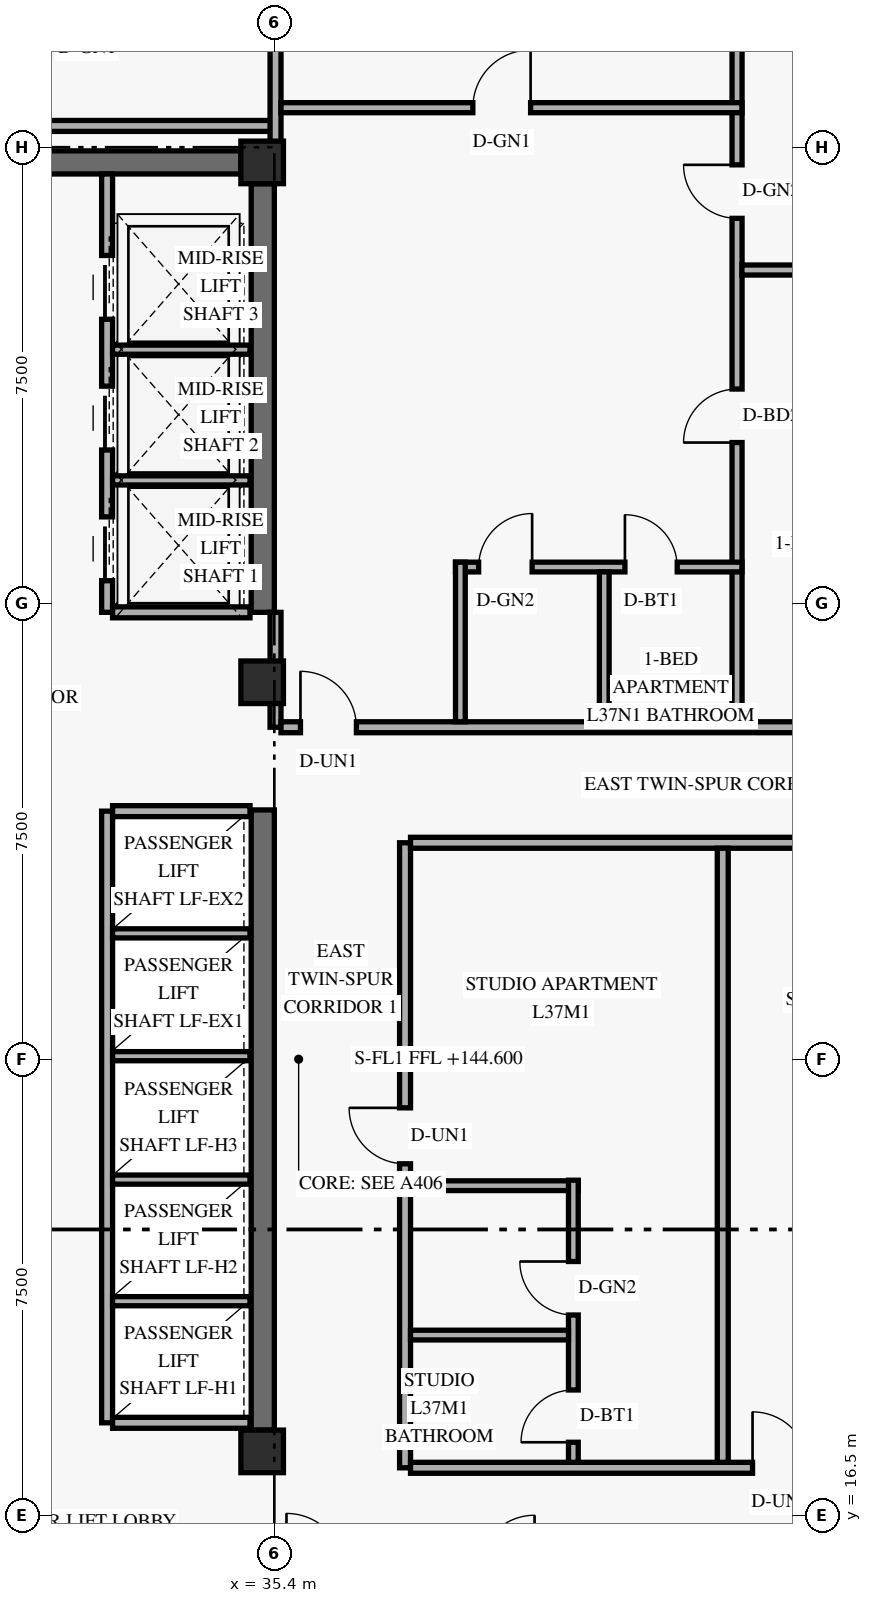
"""IFC4 building model, lengths in metres.
Left out: names, types, materials, properties, quantities, classifications, styles, units other than length and angle.
Written with IfcOpenShell. Run it as: python <this file> out.ifc"""

import sys

from ifc_helpers import new_model, si_unit, direction, frame, frame_2d, origin, origin_2d, place, context, subcontext, project, spatial, rectangle, extrude, element, fill, save


model = new_model("IFC4")
c1 = context("Model", 3, precision=1e-05, world=origin(), true_north=direction((0.0, 1.0)))
c2 = subcontext(c1, "Body", "Model", "MODEL_VIEW")
j1 = project(units=[si_unit("LENGTHUNIT", "METRE"), si_unit("PLANEANGLEUNIT", "RADIAN")], contexts=[c1])
p1 = place(None, origin())
s1 = spatial("IfcSite", under=j1, at=p1, CompositionType="ELEMENT")
p2 = place(p1, origin())
s2 = spatial("IfcBuilding", under=s1, at=p2, CompositionType="ELEMENT")
p3 = place(p2, frame((0.0, 0.0, 144.6)))
s3 = spatial("IfcBuildingStorey", under=s2, at=p3, CompositionType="ELEMENT", Elevation=144.6)
p4 = place(p3, frame((35.21, 17.9, 0.0), z_axis=(0.0, 0.0, 1.0), x_axis=(0.0, 1.0, 0.0)))
e1 = element("IfcWall", 1, at=p4, inside=s3, PredefinedType="SHEAR", context=c2, shape_type="SweptSolid", body=[
    extrude(rectangle(XDim=10.2, YDim=0.38, at=frame_2d((5.1, 0.0))), origin(), (0.0, 0.0, 1.0), 2.748),
])
p5 = place(p3, frame((35.21, 31.35, 0.0), z_axis=(0.0, 0.0, 1.0), x_axis=(0.0, 1.0, 0.0)))
e2 = element("IfcWall", 2, at=p5, inside=s3, PredefinedType="SHEAR", context=c2, shape_type="SweptSolid", body=[
    extrude(rectangle(XDim=7.05, YDim=0.38, at=frame_2d((3.525, 0.0))), origin(), (0.0, 0.0, 1.0), 2.748),
])
p6 = place(p3, frame((24.55, 38.75, 0.0), z_axis=(0.0, 0.0, 1.0), x_axis=(1.0, 0.0, 0.0)))
e3 = element("IfcWall", 3, at=p6, inside=s3, PredefinedType="SHEAR", context=c2, shape_type="SweptSolid", body=[
    extrude(rectangle(XDim=10.3, YDim=0.38, at=frame_2d((5.15, 0.0))), origin(), (0.0, 0.0, 1.0), 3.36),
])
p7 = place(p6, frame((5.2, 0.0, 0.0)))
e4 = element("IfcOpeningElement", 4, at=p7, cuts=e3, PredefinedType="OPENING", context=c2, shape_type="SweptSolid", body=[
    extrude(rectangle(XDim=1.05, YDim=2.15, at=frame_2d((0.525, 1.075))), frame((0.0, 0.2, 0.0), z_axis=(0.0, -1.0, 0.0), x_axis=(1.0, 0.0, 0.0)), (0.0, 0.0, 1.0), 0.4),
])
for number, where, z_axis, x_axis in (
    (5, (35.2, 17.55, 0.0), (0.0, 0.0, 1.0), (1.0, 0.0, 0.0)),
    (6, (35.2, 30.2, 0.0), (0.0, 0.0, 1.0), (1.0, 0.0, 0.0)),
    (7, (35.2, 38.75, 0.0), (0.0, 0.0, 1.0), (1.0, 0.0, 0.0)),
):
    element("IfcColumn", number, at=place(p3, frame(where, z_axis=z_axis, x_axis=x_axis)), inside=s3, PredefinedType="COLUMN", context=c2, shape_type="SweptSolid", body=[
        extrude(rectangle(XDim=0.7, YDim=0.7, at=origin_2d()), origin(), (0.0, 0.0, 1.0), 3.6),
    ])
p8 = place(p3, frame((32.65, 18.02, 0.0), z_axis=(0.0, 0.0, 1.0), x_axis=(0.0, 1.0, 0.0)))
e8 = element("IfcWall", 8, at=p8, inside=s3, PredefinedType="STANDARD", context=c2, shape_type="SweptSolid", body=[
    extrude(rectangle(XDim=10.06, YDim=0.18, at=frame_2d((5.03, 0.0))), origin(), (0.0, 0.0, 1.0), 3.36),
])
for number, where, z_axis, x_axis in (
    (9, (32.74, 18.02, 0.0), (0.0, 0.0, 1.0), (1.0, 0.0, 0.0)),
    (10, (32.74, 28.08, 0.0), (0.0, 0.0, 1.0), (1.0, 0.0, 0.0)),
):
    element("IfcWall", number, at=place(p3, frame(where, z_axis=z_axis, x_axis=x_axis)), inside=s3, PredefinedType="STANDARD", context=c2, shape_type="SweptSolid", body=[
        extrude(rectangle(XDim=2.26, YDim=0.18, at=frame_2d((1.13, 0.0))), origin(), (0.0, 0.0, 1.0), 3.36),
    ])
for number, where, z_axis, x_axis in (
    (11, (32.74, 20.02, 0.0), (0.0, 0.0, 1.0), (1.0, 0.0, 0.0)),
    (12, (32.74, 22.02, 0.0), (0.0, 0.0, 1.0), (1.0, 0.0, 0.0)),
    (13, (32.74, 24.05, 0.0), (0.0, 0.0, 1.0), (1.0, 0.0, 0.0)),
    (14, (32.74, 26.07, 0.0), (0.0, 0.0, 1.0), (1.0, 0.0, 0.0)),
):
    element("IfcWall", number, at=place(p3, frame(where, z_axis=z_axis, x_axis=x_axis)), inside=s3, PredefinedType="STANDARD", context=c2, shape_type="SweptSolid", body=[
        extrude(rectangle(XDim=2.26, YDim=0.15, at=frame_2d((1.13, 0.0))), origin(), (0.0, 0.0, 1.0), 3.36),
    ])
p9 = place(p3, frame((32.65, 31.35, 0.0), z_axis=(0.0, 0.0, 1.0), x_axis=(0.0, 1.0, 0.0)))
e15 = element("IfcWall", 15, at=p9, inside=s3, PredefinedType="STANDARD", context=c2, shape_type="SweptSolid", body=[
    extrude(rectangle(XDim=7.21, YDim=0.18, at=frame_2d((3.605, 0.0))), origin(), (0.0, 0.0, 1.0), 3.36),
])
p10 = place(p9, frame((0.52, 0.0, 0.0)))
e16 = element("IfcOpeningElement", 16, at=p10, cuts=e15, PredefinedType="OPENING", context=c2, shape_type="SweptSolid", body=[
    extrude(rectangle(XDim=1.05, YDim=2.2, at=frame_2d((0.525, 1.1))), frame((0.0, 0.1, 0.0), z_axis=(0.0, -1.0, 0.0), x_axis=(1.0, 0.0, 0.0)), (0.0, 0.0, 1.0), 0.2),
])
p11 = place(p9, frame((2.67, 0.0, 0.0)))
e17 = element("IfcOpeningElement", 17, at=p11, cuts=e15, PredefinedType="OPENING", context=c2, shape_type="SweptSolid", body=[
    extrude(rectangle(XDim=1.05, YDim=2.2, at=frame_2d((0.525, 1.1))), frame((0.0, 0.1, 0.0), z_axis=(0.0, -1.0, 0.0), x_axis=(1.0, 0.0, 0.0)), (0.0, 0.0, 1.0), 0.2),
])
p12 = place(p9, frame((4.82, 0.0, 0.0)))
e18 = element("IfcOpeningElement", 18, at=p12, cuts=e15, PredefinedType="OPENING", context=c2, shape_type="SweptSolid", body=[
    extrude(rectangle(XDim=1.05, YDim=2.2, at=frame_2d((0.525, 1.1))), frame((0.0, 0.1, 0.0), z_axis=(0.0, -1.0, 0.0), x_axis=(1.0, 0.0, 0.0)), (0.0, 0.0, 1.0), 0.2),
])
p13 = place(p3, frame((32.74, 31.35, 0.0), z_axis=(0.0, 0.0, 1.0), x_axis=(1.0, 0.0, 0.0)))
e19 = element("IfcWall", 19, at=p13, inside=s3, PredefinedType="STANDARD", context=c2, shape_type="SweptSolid", body=[
    extrude(rectangle(XDim=2.26, YDim=0.18, at=frame_2d((1.13, 0.0))), origin(), (0.0, 0.0, 1.0), 3.36),
])
for number, where, z_axis, x_axis in (
    (20, (32.74, 33.52, 0.0), (0.0, 0.0, 1.0), (1.0, 0.0, 0.0)),
    (21, (32.74, 35.67, 0.0), (0.0, 0.0, 1.0), (1.0, 0.0, 0.0)),
):
    element("IfcWall", number, at=place(p3, frame(where, z_axis=z_axis, x_axis=x_axis)), inside=s3, PredefinedType="STANDARD", context=c2, shape_type="SweptSolid", body=[
        extrude(rectangle(XDim=2.26, YDim=0.15, at=frame_2d((1.13, 0.0))), origin(), (0.0, 0.0, 1.0), 3.36),
    ])
p14 = place(p3, frame((37.55, 17.28, 0.0), z_axis=(0.0, 0.0, 1.0), x_axis=(0.0, 1.0, 0.0)))
e22 = element("IfcWall", 22, at=p14, inside=s3, PredefinedType="STANDARD", context=c2, shape_type="SweptSolid", body=[
    extrude(rectangle(XDim=10.28, YDim=0.18, at=frame_2d((5.14, 0.0))), origin(), (0.0, 0.0, 1.0), 2.73),
])
p15 = place(p14, frame((5.0, 0.0, 0.0)))
e23 = element("IfcOpeningElement", 23, at=p15, cuts=e22, PredefinedType="OPENING", context=c2, shape_type="SweptSolid", body=[
    extrude(rectangle(XDim=0.92, YDim=2.15, at=frame_2d((0.46, 1.075))), frame((0.0, 0.1, 0.0), z_axis=(0.0, -1.0, 0.0), x_axis=(1.0, 0.0, 0.0)), (0.0, 0.0, 1.0), 0.2),
])
p16 = place(p3, frame((37.64, 17.28, 0.0), z_axis=(0.0, 0.0, 1.0), x_axis=(1.0, 0.0, 0.0)))
e24 = element("IfcWall", 24, at=p16, inside=s3, PredefinedType="STANDARD", context=c2, shape_type="SweptSolid", body=[
    extrude(rectangle(XDim=10.36, YDim=0.18, at=frame_2d((5.18, 0.0))), origin(), (0.0, 0.0, 1.0), 2.73),
])
p17 = place(p16, frame((5.625, 0.0, 0.0)))
e25 = element("IfcOpeningElement", 25, at=p17, cuts=e24, PredefinedType="OPENING", context=c2, shape_type="SweptSolid", body=[
    extrude(rectangle(XDim=0.92, YDim=2.15, at=frame_2d((0.46, 1.075))), frame((0.0, 0.1, 0.0), z_axis=(0.0, -1.0, 0.0), x_axis=(1.0, 0.0, 0.0)), (0.0, 0.0, 1.0), 0.2),
])
p18 = place(p3, frame((37.64, 27.56, 0.0), z_axis=(0.0, 0.0, 1.0), x_axis=(1.0, 0.0, 0.0)))
e26 = element("IfcWall", 26, at=p18, inside=s3, PredefinedType="STANDARD", context=c2, shape_type="SweptSolid", body=[
    extrude(rectangle(XDim=10.36, YDim=0.18, at=frame_2d((5.18, 0.0))), origin(), (0.0, 0.0, 1.0), 2.73),
])
p19 = place(p3, frame((35.42, 29.46, 0.0), z_axis=(0.0, 0.0, 1.0), x_axis=(0.0, 1.0, 0.0)))
e27 = element("IfcWall", 27, at=p19, inside=s3, PredefinedType="STANDARD", context=c2, shape_type="SweptSolid", body=[
    extrude(rectangle(XDim=1.89, YDim=0.18, at=frame_2d((0.945, 0.0))), origin(), (0.0, 0.0, 1.0), 2.73),
])
p20 = place(p3, frame((35.51, 29.46, 0.0), z_axis=(0.0, 0.0, 1.0), x_axis=(1.0, 0.0, 0.0)))
e28 = element("IfcWall", 28, at=p20, inside=s3, PredefinedType="STANDARD", context=c2, shape_type="SweptSolid", body=[
    extrude(rectangle(XDim=12.49, YDim=0.18, at=frame_2d((6.245, 0.0))), origin(), (0.0, 0.0, 1.0), 2.73),
])
p21 = place(p20, frame((0.32, 0.0, 0.0)))
e29 = element("IfcOpeningElement", 29, at=p21, cuts=e28, PredefinedType="OPENING", context=c2, shape_type="SweptSolid", body=[
    extrude(rectangle(XDim=0.92, YDim=2.15, at=frame_2d((0.46, 1.075))), frame((0.0, 0.1, 0.0), z_axis=(0.0, -1.0, 0.0), x_axis=(1.0, 0.0, 0.0)), (0.0, 0.0, 1.0), 0.2),
])
p22 = place(p3, frame((23.85, 39.35, 0.0), z_axis=(0.0, 0.0, 1.0), x_axis=(1.0, 0.0, 0.0)))
e30 = element("IfcWall", 30, at=p22, inside=s3, PredefinedType="STANDARD", context=c2, shape_type="SweptSolid", body=[
    extrude(rectangle(XDim=11.57, YDim=0.18, at=frame_2d((5.785, 0.0))), origin(), (0.0, 0.0, 1.0), 2.73),
])
p23 = place(p3, frame((35.42, 38.75, 0.0), z_axis=(0.0, 0.0, 1.0), x_axis=(0.0, 1.0, 0.0)))
e31 = element("IfcWall", 31, at=p23, inside=s3, PredefinedType="PARTITIONING", context=c2, shape_type="SweptSolid", body=[
    extrude(rectangle(XDim=4.97, YDim=0.18, at=frame_2d((2.485, 0.0))), origin(), (0.0, 0.0, 1.0), 2.73),
])
p24 = place(p3, frame((43.01, 29.55, 0.0), z_axis=(0.0, 0.0, 1.0), x_axis=(0.0, 1.0, 0.0)))
e32 = element("IfcWall", 32, at=p24, inside=s3, PredefinedType="PARTITIONING", context=c2, shape_type="SweptSolid", body=[
    extrude(rectangle(XDim=14.17, YDim=0.165, at=frame_2d((7.085, 0.0))), origin(), (0.0, 0.0, 1.0), 2.73),
])
p25 = place(p24, frame((4.593, 0.0, 0.0)))
e33 = element("IfcOpeningElement", 33, at=p25, cuts=e32, PredefinedType="OPENING", context=c2, shape_type="SweptSolid", body=[
    extrude(rectangle(XDim=0.88, YDim=2.14, at=frame_2d((0.44, 1.07))), frame((0.0, 0.093, 0.0), z_axis=(0.0, -1.0, 0.0), x_axis=(1.0, 0.0, 0.0)), (0.0, 0.0, 1.0), 0.185),
])
p26 = place(p24, frame((8.28, 0.0, 0.0)))
e34 = element("IfcOpeningElement", 34, at=p26, cuts=e32, PredefinedType="OPENING", context=c2, shape_type="SweptSolid", body=[
    extrude(rectangle(XDim=0.88, YDim=2.12, at=frame_2d((0.44, 1.06))), frame((0.0, 0.093, 0.0), z_axis=(0.0, -1.0, 0.0), x_axis=(1.0, 0.0, 0.0)), (0.0, 0.0, 1.0), 0.185),
])
p27 = place(p3, frame((38.38, 32.095, 0.0), z_axis=(0.0, 0.0, 1.0), x_axis=(1.0, 0.0, 0.0)))
e35 = element("IfcWall", 35, at=p27, inside=s3, PredefinedType="PLUMBINGWALL", context=c2, shape_type="SweptSolid", body=[
    extrude(rectangle(XDim=4.71, YDim=0.16, at=frame_2d((2.355, 0.0))), origin(), (0.0, 0.0, 1.0), 3.36),
])
p28 = place(p27, frame((0.38, 0.0, 0.0)))
e36 = element("IfcOpeningElement", 36, at=p28, cuts=e35, PredefinedType="OPENING", context=c2, shape_type="SweptSolid", body=[
    extrude(rectangle(XDim=0.88, YDim=2.12, at=frame_2d((0.44, 1.06))), frame((0.0, 0.09, 0.0), z_axis=(0.0, -1.0, 0.0), x_axis=(1.0, 0.0, 0.0)), (0.0, 0.0, 1.0), 0.18),
])
p29 = place(p27, frame((2.786, 0.0, 0.0)))
e37 = element("IfcOpeningElement", 37, at=p29, cuts=e35, PredefinedType="OPENING", context=c2, shape_type="SweptSolid", body=[
    extrude(rectangle(XDim=0.86, YDim=2.12, at=frame_2d((0.43, 1.06))), frame((0.0, 0.09, 0.0), z_axis=(0.0, -1.0, 0.0), x_axis=(1.0, 0.0, 0.0)), (0.0, 0.0, 1.0), 0.18),
])
p30 = place(p3, frame((38.46, 29.55, 0.0), z_axis=(0.0, 0.0, 1.0), x_axis=(0.0, 1.0, 0.0)))
e38 = element("IfcWall", 38, at=p30, inside=s3, PredefinedType="PLUMBINGWALL", context=c2, shape_type="SweptSolid", body=[
    extrude(rectangle(XDim=2.625, YDim=0.16, at=frame_2d((1.312, 0.0))), origin(), (0.0, 0.0, 1.0), 2.73),
])
p31 = place(p3, frame((40.826, 29.55, 0.0), z_axis=(0.0, 0.0, 1.0), x_axis=(0.0, 1.0, 0.0)))
e39 = element("IfcWall", 39, at=p31, inside=s3, PredefinedType="PLUMBINGWALL", context=c2, shape_type="SweptSolid", body=[
    extrude(rectangle(XDim=2.465, YDim=0.16, at=frame_2d((1.232, 0.0))), origin(), (0.0, 0.0, 1.0), 2.73),
])
p32 = place(p3, frame((35.51, 39.65, 0.0), z_axis=(0.0, 0.0, 1.0), x_axis=(1.0, 0.0, 0.0)))
e40 = element("IfcWall", 40, at=p32, inside=s3, PredefinedType="PARTITIONING", context=c2, shape_type="SweptSolid", body=[
    extrude(rectangle(XDim=7.58, YDim=0.165, at=frame_2d((3.79, 0.0))), origin(), (0.0, 0.0, 1.0), 3.36),
])
p33 = place(p32, frame((3.155, 0.0, 0.0)))
e41 = element("IfcOpeningElement", 41, at=p33, cuts=e40, PredefinedType="OPENING", context=c2, shape_type="SweptSolid", body=[
    extrude(rectangle(XDim=0.95, YDim=2.15, at=frame_2d((0.475, 1.075))), frame((0.0, 0.093, 0.0), z_axis=(0.0, -1.0, 0.0), x_axis=(1.0, 0.0, 0.0)), (0.0, 0.0, 1.0), 0.185),
])
p34 = place(p3, frame((43.09, 36.98, 0.0), z_axis=(0.0, 0.0, 1.0), x_axis=(1.0, 0.0, 0.0)))
e42 = element("IfcWall", 42, at=p34, inside=s3, PredefinedType="PARTITIONING", context=c2, shape_type="SweptSolid", body=[
    extrude(rectangle(XDim=4.82, YDim=0.165, at=frame_2d((2.41, 0.0))), origin(), (0.0, 0.0, 1.0), 2.73),
])
p35 = place(p3, frame((42.775, 17.37, 0.0), z_axis=(0.0, 0.0, 1.0), x_axis=(0.0, 1.0, 0.0)))
e43 = element("IfcWall", 43, at=p35, inside=s3, PredefinedType="PARTITIONING", context=c2, shape_type="SweptSolid", body=[
    extrude(rectangle(XDim=10.1, YDim=0.18, at=frame_2d((5.05, 0.0))), origin(), (0.0, 0.0, 1.0), 2.73),
])
p36 = place(p3, frame((37.64, 21.92, 0.0), z_axis=(0.0, 0.0, 1.0), x_axis=(1.0, 0.0, 0.0)))
e44 = element("IfcWall", 44, at=p36, inside=s3, PredefinedType="PLUMBINGWALL", context=c2, shape_type="SweptSolid", body=[
    extrude(rectangle(XDim=2.758, YDim=0.16, at=frame_2d((1.379, 0.0))), origin(), (0.0, 0.0, 1.0), 3.36),
])
p37 = place(p3, frame((40.318, 17.37, 0.0), z_axis=(0.0, 0.0, 1.0), x_axis=(0.0, 1.0, 0.0)))
e45 = element("IfcWall", 45, at=p37, inside=s3, PredefinedType="PLUMBINGWALL", context=c2, shape_type="SweptSolid", body=[
    extrude(rectangle(XDim=4.64, YDim=0.16, at=frame_2d((2.32, 0.0))), origin(), (0.0, 0.0, 1.0), 2.73),
])
p38 = place(p37, frame((0.33, 0.0, 0.0)))
e46 = element("IfcOpeningElement", 46, at=p38, cuts=e45, PredefinedType="OPENING", context=c2, shape_type="SweptSolid", body=[
    extrude(rectangle(XDim=0.86, YDim=2.12, at=frame_2d((0.43, 1.06))), frame((0.0, 0.09, 0.0), z_axis=(0.0, -1.0, 0.0), x_axis=(1.0, 0.0, 0.0)), (0.0, 0.0, 1.0), 0.18),
])
p39 = place(p37, frame((2.423, 0.0, 0.0)))
e47 = element("IfcOpeningElement", 47, at=p39, cuts=e45, PredefinedType="OPENING", context=c2, shape_type="SweptSolid", body=[
    extrude(rectangle(XDim=0.88, YDim=2.12, at=frame_2d((0.44, 1.06))), frame((0.0, 0.09, 0.0), z_axis=(0.0, -1.0, 0.0), x_axis=(1.0, 0.0, 0.0)), (0.0, 0.0, 1.0), 0.18),
])
p40 = place(p3, frame((37.64, 19.463, 0.0), z_axis=(0.0, 0.0, 1.0), x_axis=(1.0, 0.0, 0.0)))
e48 = element("IfcWall", 48, at=p40, inside=s3, PredefinedType="PLUMBINGWALL", context=c2, shape_type="SweptSolid", body=[
    extrude(rectangle(XDim=2.598, YDim=0.16, at=frame_2d((1.299, 0.0))), origin(), (0.0, 0.0, 1.0), 3.36),
])
p41 = place(p10, origin())
e49 = element("IfcDoor", 49, at=p41, inside=s3, OperationType="SLIDING_TO_LEFT", PredefinedType="DOOR", context=c2, shape_type="SweptSolid", body=[
    extrude(rectangle(XDim=1.05, YDim=2.2, at=frame_2d((0.525, 1.1))), frame((0.0, 0.025, 0.0), z_axis=(0.0, -1.0, 0.0), x_axis=(1.0, 0.0, 0.0)), (0.0, 0.0, 1.0), 0.05),
])
fill(e16, e49)
p42 = place(p11, origin())
e50 = element("IfcDoor", 50, at=p42, inside=s3, OperationType="SLIDING_TO_LEFT", PredefinedType="DOOR", context=c2, shape_type="SweptSolid", body=[
    extrude(rectangle(XDim=1.05, YDim=2.2, at=frame_2d((0.525, 1.1))), frame((0.0, 0.025, 0.0), z_axis=(0.0, -1.0, 0.0), x_axis=(1.0, 0.0, 0.0)), (0.0, 0.0, 1.0), 0.05),
])
fill(e17, e50)
p43 = place(p12, origin())
e51 = element("IfcDoor", 51, at=p43, inside=s3, OperationType="SLIDING_TO_LEFT", PredefinedType="DOOR", context=c2, shape_type="SweptSolid", body=[
    extrude(rectangle(XDim=1.05, YDim=2.2, at=frame_2d((0.525, 1.1))), frame((0.0, 0.025, 0.0), z_axis=(0.0, -1.0, 0.0), x_axis=(1.0, 0.0, 0.0)), (0.0, 0.0, 1.0), 0.05),
])
fill(e18, e51)
p44 = place(p33, origin())
e52 = element("IfcDoor", 52, at=p44, inside=s3, OperationType="SINGLE_SWING_RIGHT", PredefinedType="DOOR", context=c2, shape_type="SweptSolid", body=[
    extrude(rectangle(XDim=0.95, YDim=2.15, at=frame_2d((0.475, 1.075))), frame((0.0, 0.025, 0.0), z_axis=(0.0, -1.0, 0.0), x_axis=(1.0, 0.0, 0.0)), (0.0, 0.0, 1.0), 0.05),
])
fill(e41, e52)
p45 = place(p21, origin())
e53 = element("IfcDoor", 53, at=p45, inside=s3, OperationType="SINGLE_SWING_LEFT", PredefinedType="DOOR", context=c2, shape_type="SweptSolid", body=[
    extrude(rectangle(XDim=0.92, YDim=2.15, at=frame_2d((0.46, 1.075))), frame((0.0, 0.025, 0.0), z_axis=(0.0, -1.0, 0.0), x_axis=(1.0, 0.0, 0.0)), (0.0, 0.0, 1.0), 0.05),
])
fill(e29, e53)
p46 = place(p28, origin())
e54 = element("IfcDoor", 54, at=p46, inside=s3, OperationType="SINGLE_SWING_RIGHT", PredefinedType="DOOR", context=c2, shape_type="SweptSolid", body=[
    extrude(rectangle(XDim=0.88, YDim=2.12, at=frame_2d((0.44, 1.06))), frame((0.0, 0.025, 0.0), z_axis=(0.0, -1.0, 0.0), x_axis=(1.0, 0.0, 0.0)), (0.0, 0.0, 1.0), 0.05),
])
fill(e36, e54)
p47 = place(p29, origin())
e55 = element("IfcDoor", 55, at=p47, inside=s3, OperationType="SINGLE_SWING_LEFT", PredefinedType="DOOR", context=c2, shape_type="SweptSolid", body=[
    extrude(rectangle(XDim=0.86, YDim=2.12, at=frame_2d((0.43, 1.06))), frame((0.0, 0.025, 0.0), z_axis=(0.0, -1.0, 0.0), x_axis=(1.0, 0.0, 0.0)), (0.0, 0.0, 1.0), 0.05),
])
fill(e37, e55)
p48 = place(p25, origin())
e56 = element("IfcDoor", 56, at=p48, inside=s3, OperationType="SINGLE_SWING_LEFT", PredefinedType="DOOR", context=c2, shape_type="SweptSolid", body=[
    extrude(rectangle(XDim=0.88, YDim=2.14, at=frame_2d((0.44, 1.07))), frame((0.0, 0.025, 0.0), z_axis=(0.0, -1.0, 0.0), x_axis=(1.0, 0.0, 0.0)), (0.0, 0.0, 1.0), 0.05),
])
fill(e33, e56)
p49 = place(p26, origin())
e57 = element("IfcDoor", 57, at=p49, inside=s3, OperationType="SINGLE_SWING_RIGHT", PredefinedType="DOOR", context=c2, shape_type="SweptSolid", body=[
    extrude(rectangle(XDim=0.88, YDim=2.12, at=frame_2d((0.44, 1.06))), frame((0.0, 0.025, 0.0), z_axis=(0.0, -1.0, 0.0), x_axis=(1.0, 0.0, 0.0)), (0.0, 0.0, 1.0), 0.05),
])
fill(e34, e57)
p50 = place(p15, origin())
e58 = element("IfcDoor", 58, at=p50, inside=s3, OperationType="SINGLE_SWING_RIGHT", PredefinedType="DOOR", context=c2, shape_type="SweptSolid", body=[
    extrude(rectangle(XDim=0.92, YDim=2.15, at=frame_2d((0.46, 1.075))), frame((0.0, 0.025, 0.0), z_axis=(0.0, -1.0, 0.0), x_axis=(1.0, 0.0, 0.0)), (0.0, 0.0, 1.0), 0.05),
])
fill(e23, e58)
p51 = place(p38, origin())
e59 = element("IfcDoor", 59, at=p51, inside=s3, OperationType="SINGLE_SWING_LEFT", PredefinedType="DOOR", context=c2, shape_type="SweptSolid", body=[
    extrude(rectangle(XDim=0.86, YDim=2.12, at=frame_2d((0.43, 1.06))), frame((0.0, 0.025, 0.0), z_axis=(0.0, -1.0, 0.0), x_axis=(1.0, 0.0, 0.0)), (0.0, 0.0, 1.0), 0.05),
])
fill(e46, e59)
p52 = place(p39, origin())
e60 = element("IfcDoor", 60, at=p52, inside=s3, OperationType="SINGLE_SWING_RIGHT", PredefinedType="DOOR", context=c2, shape_type="SweptSolid", body=[
    extrude(rectangle(XDim=0.88, YDim=2.12, at=frame_2d((0.44, 1.06))), frame((0.0, 0.025, 0.0), z_axis=(0.0, -1.0, 0.0), x_axis=(1.0, 0.0, 0.0)), (0.0, 0.0, 1.0), 0.05),
])
fill(e47, e60)
p53 = place(p17, origin())
e61 = element("IfcDoor", 61, at=p53, inside=s3, OperationType="SINGLE_SWING_LEFT", PredefinedType="DOOR", context=c2, shape_type="SweptSolid", body=[
    extrude(rectangle(XDim=0.92, YDim=2.15, at=frame_2d((0.46, 1.075))), frame((0.0, 0.025, 0.0), z_axis=(0.0, -1.0, 0.0), x_axis=(1.0, 0.0, 0.0)), (0.0, 0.0, 1.0), 0.05),
])
fill(e25, e61)
save(model, sys.argv[1])
